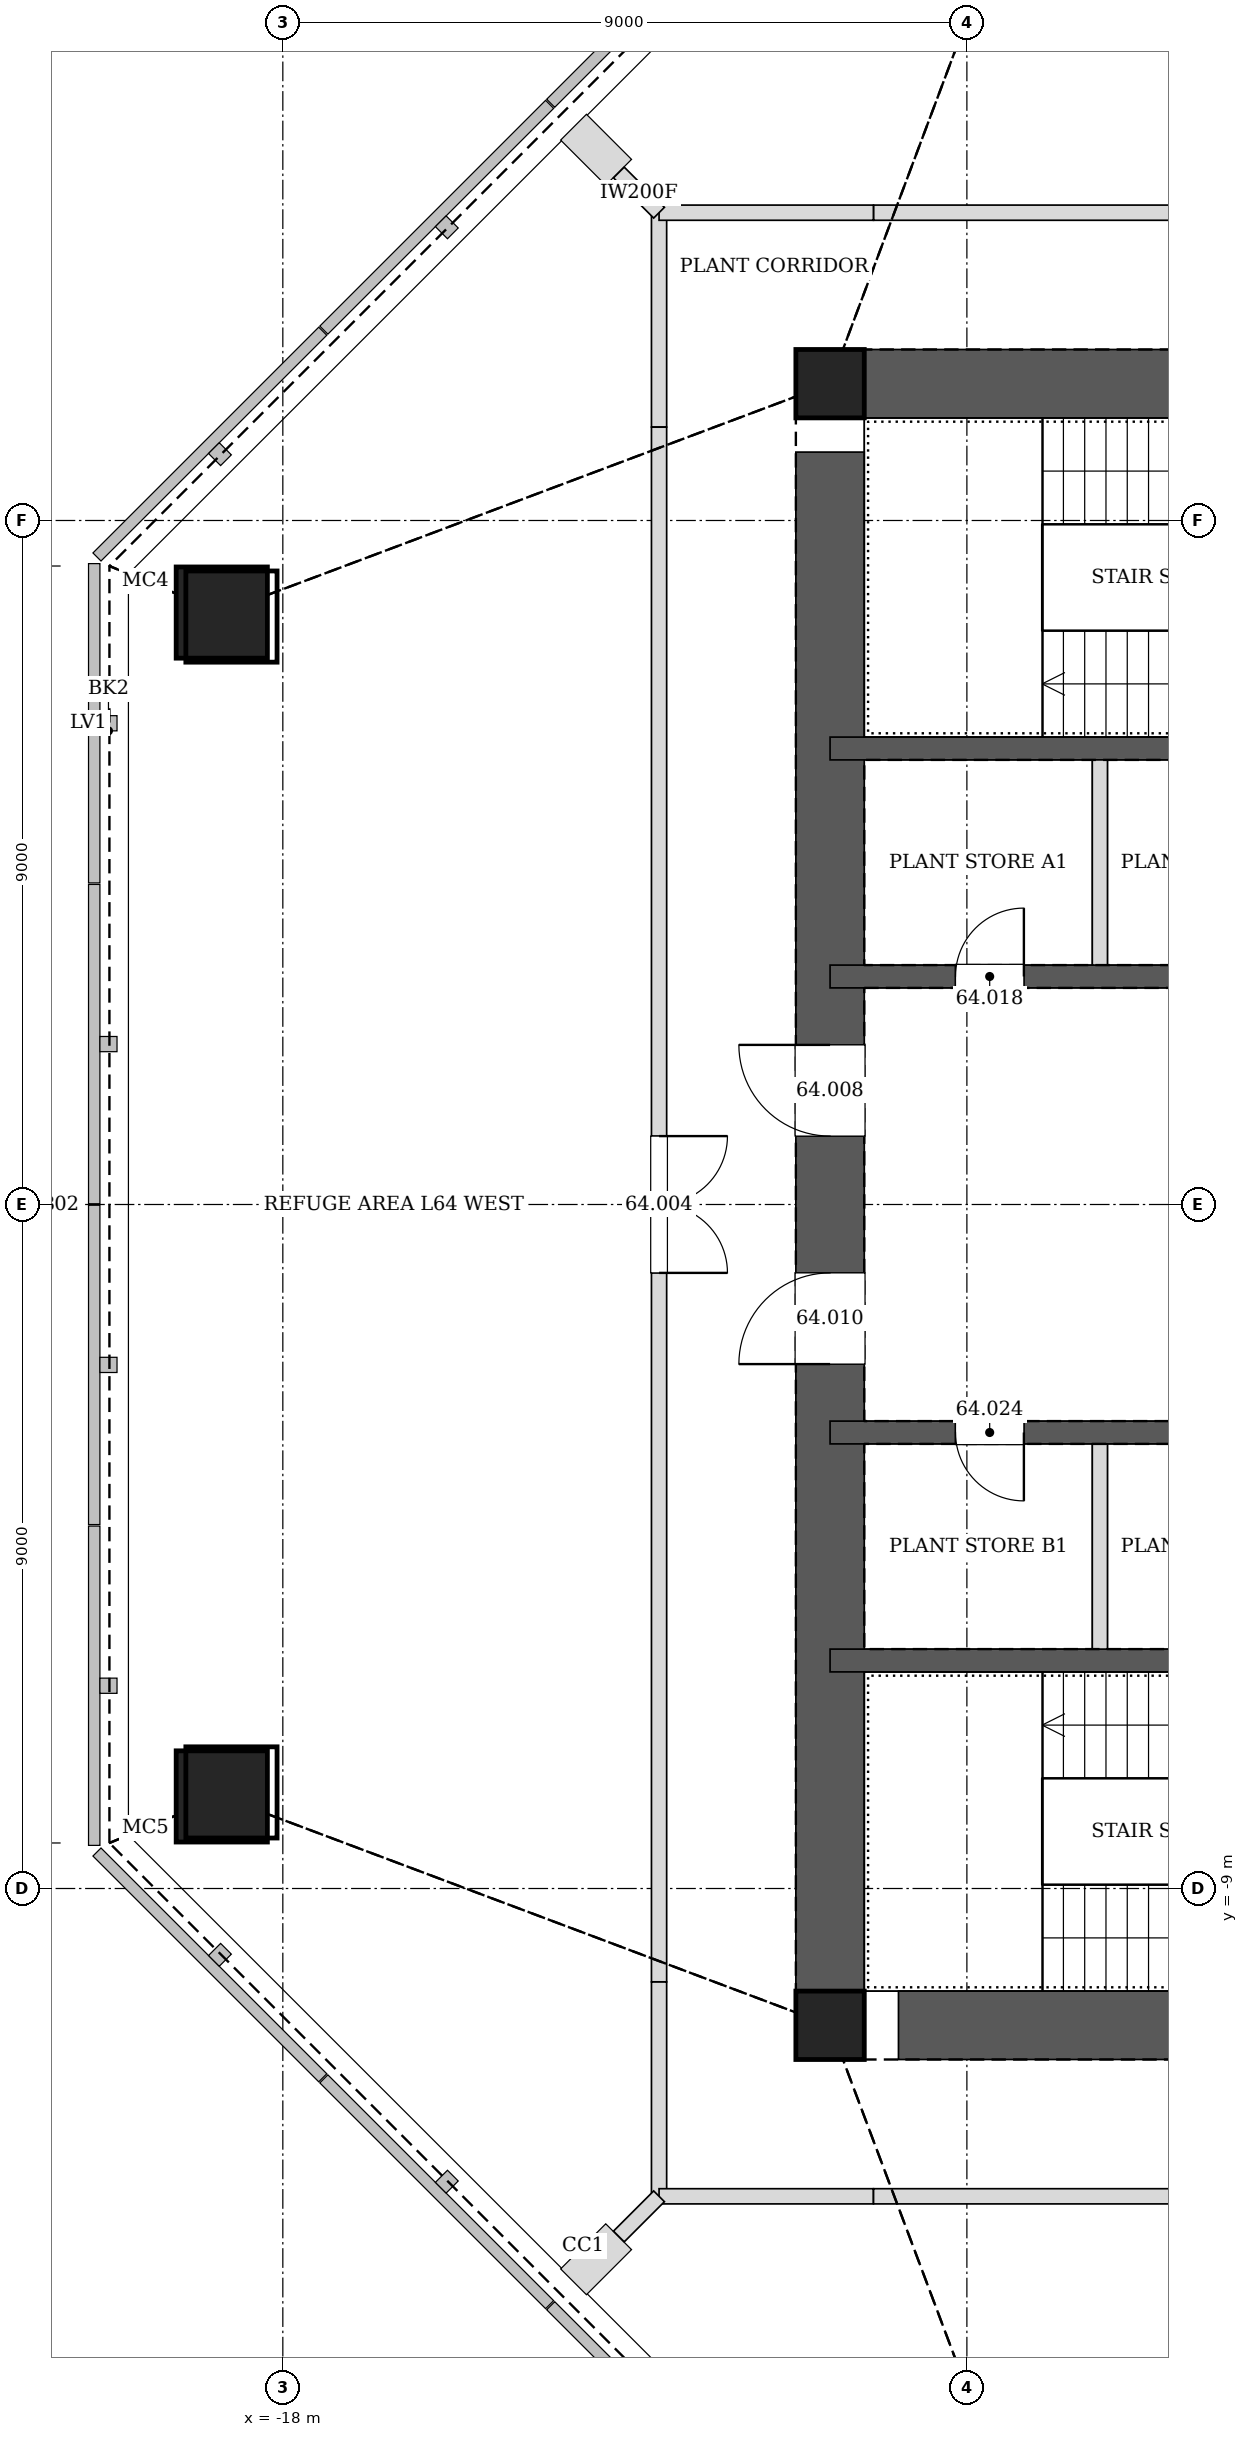
"""IFC4 building model, lengths in metres.
Left out: names, types, materials, properties, quantities, classifications, styles, units other than length and angle.
Written with IfcOpenShell. Run it as: python <this file> out.ifc"""

import sys

from ifc_helpers import new_model, si_unit, direction, frame, frame_2d, origin, origin_2d, place, context, subcontext, project, spatial, rectangle, hollow_rectangle, extrude, element, fill, save


model = new_model("IFC4")
c1 = context("Model", 3, precision=1e-05, world=origin(), true_north=direction((0.0, 1.0)))
c2 = subcontext(c1, "Body", "Model", "MODEL_VIEW")
j1 = project(units=[si_unit("LENGTHUNIT", "METRE"), si_unit("PLANEANGLEUNIT", "RADIAN")], contexts=[c1])
p1 = place(None, origin())
s1 = spatial("IfcSite", under=j1, at=p1, CompositionType="ELEMENT")
p2 = place(p1, origin())
s2 = spatial("IfcBuilding", under=s1, at=p2, CompositionType="ELEMENT")
p3 = place(p2, frame((0.0, 0.0, 266.3)))
s3 = spatial("IfcBuildingStorey", under=s2, at=p3, CompositionType="ELEMENT", Elevation=266.3)
for number, where, z_axis, x_axis in (
    (1, (-18.803, 7.789, 0.0), (0.028, -0.012, 1.0), (0.383, 0.924, 0.0)),
    (2, (-18.803, -7.789, 0.0), (0.028, 0.012, 1.0), (-0.383, 0.924, 0.0)),
):
    element("IfcColumn", number, at=place(p3, frame(where, z_axis=z_axis, x_axis=x_axis)), inside=s3, PredefinedType="COLUMN", context=c2, shape_type="SweptSolid", body=[
        extrude(hollow_rectangle(XDim=1.2, YDim=1.2, WallThickness=0.055, at=origin_2d()), origin(), (0.0, 0.0, 1.0), 4.502),
    ])
for number, where, z_axis, x_axis in (
    (3, (-10.8, 10.8, 0.0), (0.0, 0.0, 1.0), (1.0, 0.0, 0.0)),
    (4, (-10.8, -10.8, 0.0), (0.0, 0.0, 1.0), (1.0, 0.0, 0.0)),
):
    element("IfcColumn", number, at=place(p3, frame(where, z_axis=z_axis, x_axis=x_axis)), inside=s3, PredefinedType="COLUMN", context=c2, shape_type="SweptSolid", body=[
        extrude(hollow_rectangle(XDim=0.9, YDim=0.9, WallThickness=0.04, at=origin_2d()), origin(), (0.0, 0.0, 1.0), 4.5),
    ])
p4 = place(p3, frame((-10.8, -10.8, 0.0), z_axis=(0.0, 0.0, 1.0), x_axis=(1.0, 0.0, 0.0)))
e5 = element("IfcWall", 5, at=p4, inside=s3, PredefinedType="SOLIDWALL", context=c2, shape_type="SweptSolid", body=[
    extrude(rectangle(XDim=21.6, YDim=0.9, at=frame_2d((10.8, 0.0))), origin(), (0.0, 0.0, 1.0), 4.5),
])
p5 = place(p4, frame((10.05, 0.0, 0.0)))
e6 = element("IfcOpeningElement", 6, at=p5, cuts=e5, PredefinedType="OPENING", context=c2, shape_type="SweptSolid", body=[
    extrude(rectangle(XDim=1.5, YDim=2.1, at=frame_2d((0.75, 1.05))), frame((0.0, 0.46, 0.0), z_axis=(0.0, -1.0, 0.0), x_axis=(1.0, 0.0, 0.0)), (0.0, 0.0, 1.0), 0.92),
])
p6 = place(p4, frame((17.1, 0.0, 0.0)))
e7 = element("IfcOpeningElement", 7, at=p6, cuts=e5, PredefinedType="OPENING", context=c2, shape_type="SweptSolid", body=[
    extrude(rectangle(XDim=0.9, YDim=2.1, at=frame_2d((0.45, 1.05))), frame((0.0, 0.46, 0.0), z_axis=(0.0, -1.0, 0.0), x_axis=(1.0, 0.0, 0.0)), (0.0, 0.0, 1.0), 0.92),
])
p7 = place(p3, frame((10.8, 10.8, 0.0), z_axis=(0.0, 0.0, 1.0), x_axis=(-1.0, 0.0, 0.0)))
e8 = element("IfcWall", 8, at=p7, inside=s3, PredefinedType="SOLIDWALL", context=c2, shape_type="SweptSolid", body=[
    extrude(rectangle(XDim=21.6, YDim=0.9, at=frame_2d((10.8, 0.0))), origin(), (0.0, 0.0, 1.0), 4.5),
])
p8 = place(p7, frame((10.05, 0.0, 0.0)))
e9 = element("IfcOpeningElement", 9, at=p8, cuts=e8, PredefinedType="OPENING", context=c2, shape_type="SweptSolid", body=[
    extrude(rectangle(XDim=1.5, YDim=2.1, at=frame_2d((0.75, 1.05))), frame((0.0, 0.46, 0.0), z_axis=(0.0, -1.0, 0.0), x_axis=(1.0, 0.0, 0.0)), (0.0, 0.0, 1.0), 0.92),
])
p9 = place(p3, frame((-10.8, 10.8, 0.0), z_axis=(0.0, 0.0, 1.0), x_axis=(0.0, -1.0, 0.0)))
e10 = element("IfcWall", 10, at=p9, inside=s3, PredefinedType="SOLIDWALL", context=c2, shape_type="SweptSolid", body=[
    extrude(rectangle(XDim=21.6, YDim=0.9, at=frame_2d((10.8, 0.0))), origin(), (0.0, 0.0, 1.0), 4.5),
])
p10 = place(p9, frame((8.7, 0.0, 0.0)))
e11 = element("IfcOpeningElement", 11, at=p10, cuts=e10, PredefinedType="OPENING", context=c2, shape_type="SweptSolid", body=[
    extrude(rectangle(XDim=1.2, YDim=2.1, at=frame_2d((0.6, 1.05))), frame((0.0, 0.46, 0.0), z_axis=(0.0, -1.0, 0.0), x_axis=(1.0, 0.0, 0.0)), (0.0, 0.0, 1.0), 0.92),
])
p11 = place(p9, frame((11.7, 0.0, 0.0)))
e12 = element("IfcOpeningElement", 12, at=p11, cuts=e10, PredefinedType="OPENING", context=c2, shape_type="SweptSolid", body=[
    extrude(rectangle(XDim=1.2, YDim=2.1, at=frame_2d((0.6, 1.05))), frame((0.0, 0.46, 0.0), z_axis=(0.0, -1.0, 0.0), x_axis=(1.0, 0.0, 0.0)), (0.0, 0.0, 1.0), 0.92),
])
p12 = place(p3, frame((-10.8, 3.0, 0.0), z_axis=(0.0, 0.0, 1.0), x_axis=(1.0, 0.0, 0.0)))
e13 = element("IfcWall", 13, at=p12, inside=s3, PredefinedType="SOLIDWALL", context=c2, shape_type="SweptSolid", body=[
    extrude(rectangle(XDim=21.6, YDim=0.3, at=frame_2d((10.8, 0.0))), origin(), (0.0, 0.0, 1.0), 4.5),
])
p13 = place(p12, frame((1.65, 0.0, 0.0)))
e14 = element("IfcOpeningElement", 14, at=p13, cuts=e13, PredefinedType="OPENING", context=c2, shape_type="SweptSolid", body=[
    extrude(rectangle(XDim=0.9, YDim=2.1, at=frame_2d((0.45, 1.05))), frame((0.0, 0.16, 0.0), z_axis=(0.0, -1.0, 0.0), x_axis=(1.0, 0.0, 0.0)), (0.0, 0.0, 1.0), 0.32),
])
p14 = place(p12, frame((4.55, 0.0, 0.0)))
e15 = element("IfcOpeningElement", 15, at=p14, cuts=e13, PredefinedType="OPENING", context=c2, shape_type="SweptSolid", body=[
    extrude(rectangle(XDim=0.9, YDim=2.1, at=frame_2d((0.45, 1.05))), frame((0.0, 0.16, 0.0), z_axis=(0.0, -1.0, 0.0), x_axis=(1.0, 0.0, 0.0)), (0.0, 0.0, 1.0), 0.32),
])
p15 = place(p12, frame((7.45, 0.0, 0.0)))
e16 = element("IfcOpeningElement", 16, at=p15, cuts=e13, PredefinedType="OPENING", context=c2, shape_type="SweptSolid", body=[
    extrude(rectangle(XDim=0.9, YDim=2.1, at=frame_2d((0.45, 1.05))), frame((0.0, 0.16, 0.0), z_axis=(0.0, -1.0, 0.0), x_axis=(1.0, 0.0, 0.0)), (0.0, 0.0, 1.0), 0.32),
])
p16 = place(p12, frame((13.25, 0.0, 0.0)))
e17 = element("IfcOpeningElement", 17, at=p16, cuts=e13, PredefinedType="OPENING", context=c2, shape_type="SweptSolid", body=[
    extrude(rectangle(XDim=0.9, YDim=2.1, at=frame_2d((0.45, 1.05))), frame((0.0, 0.16, 0.0), z_axis=(0.0, -1.0, 0.0), x_axis=(1.0, 0.0, 0.0)), (0.0, 0.0, 1.0), 0.32),
])
p17 = place(p12, frame((16.15, 0.0, 0.0)))
e18 = element("IfcOpeningElement", 18, at=p17, cuts=e13, PredefinedType="OPENING", context=c2, shape_type="SweptSolid", body=[
    extrude(rectangle(XDim=0.9, YDim=2.1, at=frame_2d((0.45, 1.05))), frame((0.0, 0.16, 0.0), z_axis=(0.0, -1.0, 0.0), x_axis=(1.0, 0.0, 0.0)), (0.0, 0.0, 1.0), 0.32),
])
p18 = place(p12, frame((19.05, 0.0, 0.0)))
e19 = element("IfcOpeningElement", 19, at=p18, cuts=e13, PredefinedType="OPENING", context=c2, shape_type="SweptSolid", body=[
    extrude(rectangle(XDim=0.9, YDim=2.1, at=frame_2d((0.45, 1.05))), frame((0.0, 0.16, 0.0), z_axis=(0.0, -1.0, 0.0), x_axis=(1.0, 0.0, 0.0)), (0.0, 0.0, 1.0), 0.32),
])
p19 = place(p3, frame((-10.8, 6.0, 0.0), z_axis=(0.0, 0.0, 1.0), x_axis=(1.0, 0.0, 0.0)))
e20 = element("IfcWall", 20, at=p19, inside=s3, PredefinedType="SOLIDWALL", context=c2, shape_type="SweptSolid", body=[
    extrude(rectangle(XDim=21.6, YDim=0.3, at=frame_2d((10.8, 0.0))), origin(), (0.0, 0.0, 1.0), 4.5),
])
p20 = place(p19, frame((10.25, 0.0, 0.0)))
e21 = element("IfcOpeningElement", 21, at=p20, cuts=e20, PredefinedType="OPENING", context=c2, shape_type="SweptSolid", body=[
    extrude(rectangle(XDim=1.1, YDim=2.1, at=frame_2d((0.55, 1.05))), frame((0.0, 0.16, 0.0), z_axis=(0.0, -1.0, 0.0), x_axis=(1.0, 0.0, 0.0)), (0.0, 0.0, 1.0), 0.32),
])
p21 = place(p3, frame((-10.8, -3.0, 0.0), z_axis=(0.0, 0.0, 1.0), x_axis=(1.0, 0.0, 0.0)))
e22 = element("IfcWall", 22, at=p21, inside=s3, PredefinedType="SOLIDWALL", context=c2, shape_type="SweptSolid", body=[
    extrude(rectangle(XDim=21.6, YDim=0.3, at=frame_2d((10.8, 0.0))), origin(), (0.0, 0.0, 1.0), 4.5),
])
p22 = place(p21, frame((1.65, 0.0, 0.0)))
e23 = element("IfcOpeningElement", 23, at=p22, cuts=e22, PredefinedType="OPENING", context=c2, shape_type="SweptSolid", body=[
    extrude(rectangle(XDim=0.9, YDim=2.1, at=frame_2d((0.45, 1.05))), frame((0.0, 0.16, 0.0), z_axis=(0.0, -1.0, 0.0), x_axis=(1.0, 0.0, 0.0)), (0.0, 0.0, 1.0), 0.32),
])
p23 = place(p21, frame((4.55, 0.0, 0.0)))
e24 = element("IfcOpeningElement", 24, at=p23, cuts=e22, PredefinedType="OPENING", context=c2, shape_type="SweptSolid", body=[
    extrude(rectangle(XDim=0.9, YDim=2.1, at=frame_2d((0.45, 1.05))), frame((0.0, 0.16, 0.0), z_axis=(0.0, -1.0, 0.0), x_axis=(1.0, 0.0, 0.0)), (0.0, 0.0, 1.0), 0.32),
])
p24 = place(p21, frame((7.45, 0.0, 0.0)))
e25 = element("IfcOpeningElement", 25, at=p24, cuts=e22, PredefinedType="OPENING", context=c2, shape_type="SweptSolid", body=[
    extrude(rectangle(XDim=0.9, YDim=2.1, at=frame_2d((0.45, 1.05))), frame((0.0, 0.16, 0.0), z_axis=(0.0, -1.0, 0.0), x_axis=(1.0, 0.0, 0.0)), (0.0, 0.0, 1.0), 0.32),
])
p25 = place(p21, frame((13.25, 0.0, 0.0)))
e26 = element("IfcOpeningElement", 26, at=p25, cuts=e22, PredefinedType="OPENING", context=c2, shape_type="SweptSolid", body=[
    extrude(rectangle(XDim=0.9, YDim=2.1, at=frame_2d((0.45, 1.05))), frame((0.0, 0.16, 0.0), z_axis=(0.0, -1.0, 0.0), x_axis=(1.0, 0.0, 0.0)), (0.0, 0.0, 1.0), 0.32),
])
p26 = place(p3, frame((-10.8, -6.0, 0.0), z_axis=(0.0, 0.0, 1.0), x_axis=(1.0, 0.0, 0.0)))
e27 = element("IfcWall", 27, at=p26, inside=s3, PredefinedType="SOLIDWALL", context=c2, shape_type="SweptSolid", body=[
    extrude(rectangle(XDim=21.6, YDim=0.3, at=frame_2d((10.8, 0.0))), origin(), (0.0, 0.0, 1.0), 4.5),
])
p27 = place(p26, frame((10.25, 0.0, 0.0)))
e28 = element("IfcOpeningElement", 28, at=p27, cuts=e27, PredefinedType="OPENING", context=c2, shape_type="SweptSolid", body=[
    extrude(rectangle(XDim=1.1, YDim=2.1, at=frame_2d((0.55, 1.05))), frame((0.0, 0.16, 0.0), z_axis=(0.0, -1.0, 0.0), x_axis=(1.0, 0.0, 0.0)), (0.0, 0.0, 1.0), 0.32),
])
p28 = place(p3, frame((-13.05, 13.05, 0.0), z_axis=(0.0, 0.0, 1.0), x_axis=(0.0, -1.0, 0.0)))
e29 = element("IfcWall", 29, at=p28, inside=s3, PredefinedType="PARTITIONING", context=c2, shape_type="SweptSolid", body=[
    extrude(rectangle(XDim=2.82, YDim=0.2, at=frame_2d((1.41, 0.0))), origin(), (0.0, 0.0, 1.0), 3.678),
])
p29 = place(p3, frame((-13.05, 10.228, 0.0), z_axis=(0.0, 0.0, 1.0), x_axis=(0.0, -1.0, 0.0)))
e30 = element("IfcWall", 30, at=p29, inside=s3, PredefinedType="PARTITIONING", context=c2, shape_type="SweptSolid", body=[
    extrude(rectangle(XDim=20.456, YDim=0.2, at=frame_2d((10.228, 0.0))), origin(), (0.0, 0.0, 1.0), 3.363),
])
p30 = place(p29, frame((9.328, 0.0, 0.0)))
e31 = element("IfcOpeningElement", 31, at=p30, cuts=e30, PredefinedType="OPENING", context=c2, shape_type="SweptSolid", body=[
    extrude(rectangle(XDim=1.8, YDim=2.4, at=frame_2d((0.9, 1.2))), frame((0.0, 0.11, 0.0), z_axis=(0.0, -1.0, 0.0), x_axis=(1.0, 0.0, 0.0)), (0.0, 0.0, 1.0), 0.22),
])
p31 = place(p3, frame((-13.05, -10.23, 0.0), z_axis=(0.0, 0.0, 1.0), x_axis=(0.0, -1.0, 0.0)))
e32 = element("IfcWall", 32, at=p31, inside=s3, PredefinedType="PARTITIONING", context=c2, shape_type="SweptSolid", body=[
    extrude(rectangle(XDim=2.82, YDim=0.2, at=frame_2d((1.41, 0.0))), origin(), (0.0, 0.0, 1.0), 3.678),
])
p32 = place(p3, frame((10.228, 13.05, 0.0), z_axis=(0.0, 0.0, 1.0), x_axis=(-1.0, 0.0, 0.0)))
e33 = element("IfcWall", 33, at=p32, inside=s3, PredefinedType="PARTITIONING", context=c2, shape_type="SweptSolid", body=[
    extrude(rectangle(XDim=20.456, YDim=0.2, at=frame_2d((10.228, 0.0))), origin(), (0.0, 0.0, 1.0), 3.363),
])
p33 = place(p32, frame((9.328, 0.0, 0.0)))
e34 = element("IfcOpeningElement", 34, at=p33, cuts=e33, PredefinedType="OPENING", context=c2, shape_type="SweptSolid", body=[
    extrude(rectangle(XDim=1.8, YDim=2.4, at=frame_2d((0.9, 1.2))), frame((0.0, 0.11, 0.0), z_axis=(0.0, -1.0, 0.0), x_axis=(1.0, 0.0, 0.0)), (0.0, 0.0, 1.0), 0.22),
])
for number, where, z_axis, x_axis in (
    (35, (-10.23, 13.05, 0.0), (0.0, 0.0, 1.0), (-1.0, 0.0, 0.0)),
    (36, (-13.05, -13.05, 0.0), (0.0, 0.0, 1.0), (1.0, 0.0, 0.0)),
):
    element("IfcWall", number, at=place(p3, frame(where, z_axis=z_axis, x_axis=x_axis)), inside=s3, PredefinedType="PARTITIONING", context=c2, shape_type="SweptSolid", body=[
        extrude(rectangle(XDim=2.82, YDim=0.2, at=frame_2d((1.41, 0.0))), origin(), (0.0, 0.0, 1.0), 3.678),
    ])
p34 = place(p3, frame((-10.228, -13.05, 0.0), z_axis=(0.0, 0.0, 1.0), x_axis=(1.0, 0.0, 0.0)))
e37 = element("IfcWall", 37, at=p34, inside=s3, PredefinedType="PARTITIONING", context=c2, shape_type="SweptSolid", body=[
    extrude(rectangle(XDim=20.456, YDim=0.2, at=frame_2d((10.228, 0.0))), origin(), (0.0, 0.0, 1.0), 3.363),
])
p35 = place(p34, frame((9.328, 0.0, 0.0)))
e38 = element("IfcOpeningElement", 38, at=p35, cuts=e37, PredefinedType="OPENING", context=c2, shape_type="SweptSolid", body=[
    extrude(rectangle(XDim=1.8, YDim=2.4, at=frame_2d((0.9, 1.2))), frame((0.0, 0.11, 0.0), z_axis=(0.0, -1.0, 0.0), x_axis=(1.0, 0.0, 0.0)), (0.0, 0.0, 1.0), 0.22),
])
for number, where, z_axis, x_axis in (
    (39, (-13.05, 13.05, 0.0), (0.0, 0.0, 1.0), (-0.707, 0.707, 0.0)),
    (40, (-13.579, -13.579, 0.0), (0.0, 0.0, 1.0), (0.707, 0.707, 0.0)),
):
    element("IfcWall", number, at=place(p3, frame(where, z_axis=z_axis, x_axis=x_axis)), inside=s3, PredefinedType="PARTITIONING", context=c2, shape_type="SweptSolid", body=[
        extrude(rectangle(XDim=0.748, YDim=0.2, at=frame_2d((0.374, 0.0))), origin(), (0.0, 0.0, 1.0), 3.678),
    ])
for number, where, z_axis, x_axis in (
    (41, (-7.25, 3.15, 0.0), (0.0, 0.0, 1.0), (0.0, 1.0, 0.0)),
    (42, (-7.25, -5.85, 0.0), (0.0, 0.0, 1.0), (0.0, 1.0, 0.0)),
):
    element("IfcWall", number, at=place(p3, frame(where, z_axis=z_axis, x_axis=x_axis)), inside=s3, PredefinedType="PARTITIONING", context=c2, shape_type="SweptSolid", body=[
        extrude(rectangle(XDim=2.7, YDim=0.2, at=frame_2d((1.35, 0.0))), origin(), (0.0, 0.0, 1.0), 4.3),
    ])
p36 = place(p30, origin())
e43 = element("IfcDoor", 43, at=p36, inside=s3, OperationType="DOUBLE_DOOR_SINGLE_SWING", PredefinedType="DOOR", context=c2, shape_type="SweptSolid", body=[
    extrude(rectangle(XDim=1.8, YDim=2.4, at=frame_2d((0.9, 1.2))), frame((0.0, 0.025, 0.0), z_axis=(0.0, -1.0, 0.0), x_axis=(1.0, 0.0, 0.0)), (0.0, 0.0, 1.0), 0.05),
])
fill(e31, e43)
p37 = place(p10, frame((1.2, 0.0, 0.0), z_axis=(0.0, 0.0, 1.0), x_axis=(-1.0, 0.0, 0.0)))
e44 = element("IfcDoor", 44, at=p37, inside=s3, OperationType="SINGLE_SWING_RIGHT", PredefinedType="DOOR", context=c2, shape_type="SweptSolid", body=[
    extrude(rectangle(XDim=1.2, YDim=2.1, at=frame_2d((0.6, 1.05))), frame((0.0, 0.025, 0.0), z_axis=(0.0, -1.0, 0.0), x_axis=(1.0, 0.0, 0.0)), (0.0, 0.0, 1.0), 0.05),
])
fill(e11, e44)
p38 = place(p11, frame((1.2, 0.0, 0.0), z_axis=(0.0, 0.0, 1.0), x_axis=(-1.0, 0.0, 0.0)))
e45 = element("IfcDoor", 45, at=p38, inside=s3, OperationType="SINGLE_SWING_LEFT", PredefinedType="DOOR", context=c2, shape_type="SweptSolid", body=[
    extrude(rectangle(XDim=1.2, YDim=2.1, at=frame_2d((0.6, 1.05))), frame((0.0, 0.025, 0.0), z_axis=(0.0, -1.0, 0.0), x_axis=(1.0, 0.0, 0.0)), (0.0, 0.0, 1.0), 0.05),
])
fill(e12, e45)
p39 = place(p13, origin())
e46 = element("IfcDoor", 46, at=p39, inside=s3, OperationType="SINGLE_SWING_RIGHT", PredefinedType="DOOR", context=c2, shape_type="SweptSolid", body=[
    extrude(rectangle(XDim=0.9, YDim=2.1, at=frame_2d((0.45, 1.05))), frame((0.0, 0.025, 0.0), z_axis=(0.0, -1.0, 0.0), x_axis=(1.0, 0.0, 0.0)), (0.0, 0.0, 1.0), 0.05),
])
fill(e14, e46)
p40 = place(p22, frame((0.9, 0.0, 0.0), z_axis=(0.0, 0.0, 1.0), x_axis=(-1.0, 0.0, 0.0)))
e47 = element("IfcDoor", 47, at=p40, inside=s3, OperationType="SINGLE_SWING_LEFT", PredefinedType="DOOR", context=c2, shape_type="SweptSolid", body=[
    extrude(rectangle(XDim=0.9, YDim=2.1, at=frame_2d((0.45, 1.05))), frame((0.0, 0.025, 0.0), z_axis=(0.0, -1.0, 0.0), x_axis=(1.0, 0.0, 0.0)), (0.0, 0.0, 1.0), 0.05),
])
fill(e23, e47)
save(model, sys.argv[1])
